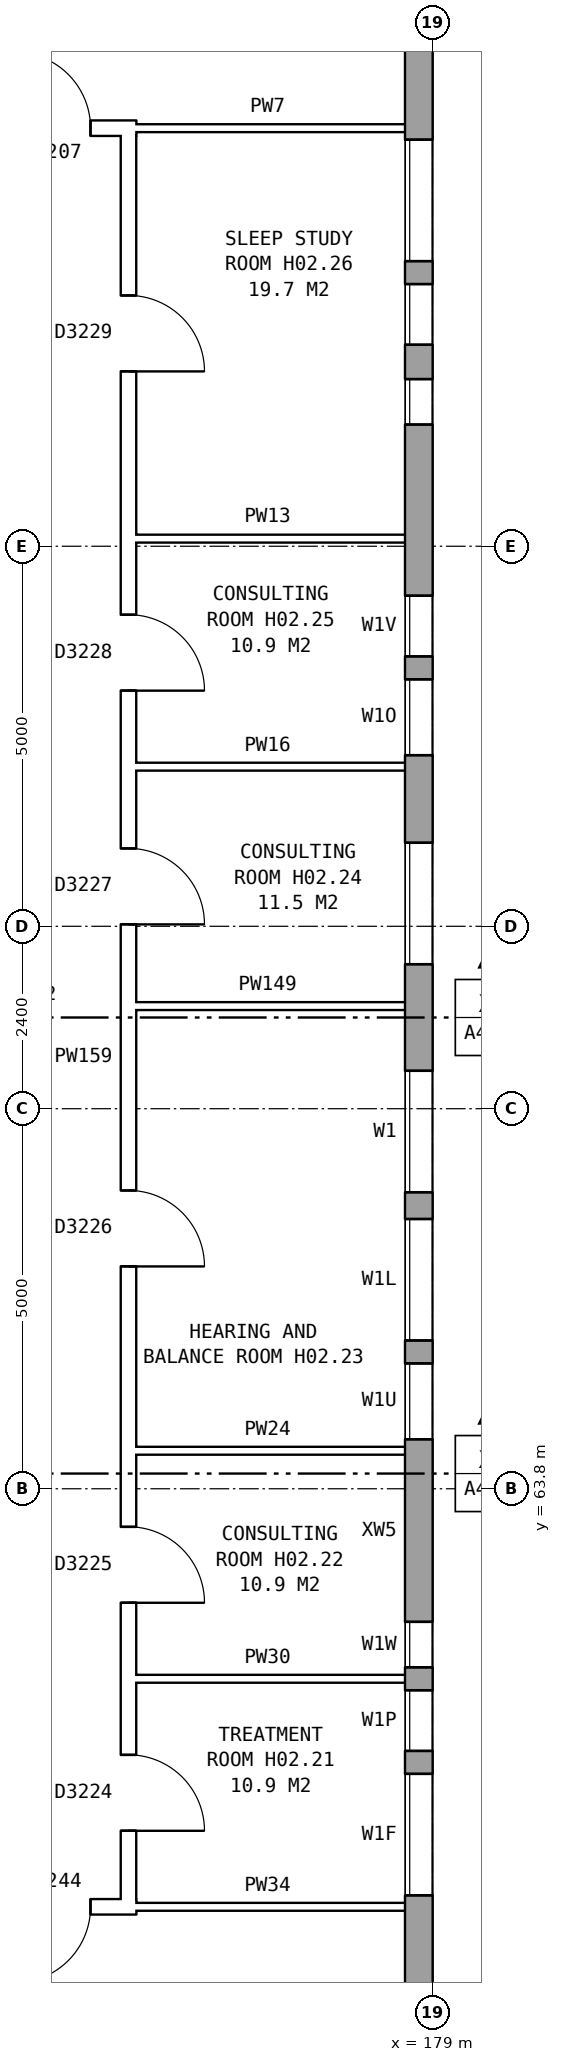
"""IFC4 building model, lengths in metres.
Left out: names, types, materials, properties, quantities, classifications, styles, units other than length and angle.
Written with IfcOpenShell. Run it as: python <this file> out.ifc"""

import sys

from ifc_helpers import new_model, si_unit, direction, frame, frame_2d, origin, place, context, subcontext, project, spatial, rectangle, extrude, element, fill, save


model = new_model("IFC4")
c1 = context("Model", 3, precision=1e-05, world=origin(), true_north=direction((0.0, 1.0)))
c2 = subcontext(c1, "Body", "Model", "MODEL_VIEW")
j1 = project(units=[si_unit("LENGTHUNIT", "METRE"), si_unit("PLANEANGLEUNIT", "RADIAN")], contexts=[c1])
p1 = place(None, origin())
s1 = spatial("IfcSite", under=j1, at=p1, CompositionType="ELEMENT")
p2 = place(p1, origin())
s2 = spatial("IfcBuilding", under=s1, at=p2, CompositionType="ELEMENT")
p3 = place(p2, frame((0.0, 0.0, 10.1)))
s3 = spatial("IfcBuildingStorey", under=s2, at=p3, CompositionType="ELEMENT", Elevation=10.1)
p4 = place(p3, frame((178.82, 57.075, 0.0), z_axis=(0.0, 0.0, 1.0), x_axis=(0.0, 1.0, 0.0)))
e1 = element("IfcWall", 1, at=p4, inside=s3, PredefinedType="STANDARD", context=c2, shape_type="SweptSolid", body=[
    extrude(rectangle(XDim=25.851, YDim=0.36, at=frame_2d((12.925, 0.0))), origin(), (0.0, 0.0, 1.0), 4.3),
])
p5 = place(p4, frame((1.375, 0.0, 0.8)))
e2 = element("IfcOpeningElement", 2, at=p5, cuts=e1, PredefinedType="OPENING", context=c2, shape_type="SweptSolid", body=[
    extrude(rectangle(XDim=1.6, YDim=1.5, at=frame_2d((0.8, 0.75))), frame((0.0, 0.19, 0.0), z_axis=(0.0, -1.0, 0.0), x_axis=(1.0, 0.0, 0.0)), (0.0, 0.0, 1.0), 0.38),
])
p6 = place(p4, frame((4.375, 0.0, 0.8)))
e3 = element("IfcOpeningElement", 3, at=p6, cuts=e1, PredefinedType="OPENING", context=c2, shape_type="SweptSolid", body=[
    extrude(rectangle(XDim=0.6, YDim=0.9, at=frame_2d((0.3, 0.45))), frame((0.0, 0.19, 0.0), z_axis=(0.0, -1.0, 0.0), x_axis=(1.0, 0.0, 0.0)), (0.0, 0.0, 1.0), 0.38),
])
p7 = place(p4, frame((7.375, 0.0, 1.7)))
e4 = element("IfcOpeningElement", 4, at=p7, cuts=e1, PredefinedType="OPENING", context=c2, shape_type="SweptSolid", body=[
    extrude(rectangle(XDim=1.0, YDim=0.9, at=frame_2d((0.5, 0.45))), frame((0.0, 0.19, 0.0), z_axis=(0.0, -1.0, 0.0), x_axis=(1.0, 0.0, 0.0)), (0.0, 0.0, 1.0), 0.38),
])
p8 = place(p4, frame((10.625, 0.0, 0.8)))
e5 = element("IfcOpeningElement", 5, at=p8, cuts=e1, PredefinedType="OPENING", context=c2, shape_type="SweptSolid", body=[
    extrude(rectangle(XDim=1.6, YDim=1.8, at=frame_2d((0.8, 0.9))), frame((0.0, 0.19, 0.0), z_axis=(0.0, -1.0, 0.0), x_axis=(1.0, 0.0, 0.0)), (0.0, 0.0, 1.0), 0.38),
])
p9 = place(p4, frame((13.625, 0.0, 0.8)))
e6 = element("IfcOpeningElement", 6, at=p9, cuts=e1, PredefinedType="OPENING", context=c2, shape_type="SweptSolid", body=[
    extrude(rectangle(XDim=1.6, YDim=1.8, at=frame_2d((0.8, 0.9))), frame((0.0, 0.19, 0.0), z_axis=(0.0, -1.0, 0.0), x_axis=(1.0, 0.0, 0.0)), (0.0, 0.0, 1.0), 0.38),
])
p10 = place(p4, frame((16.375, 0.0, 1.4)))
e7 = element("IfcOpeningElement", 7, at=p10, cuts=e1, PredefinedType="OPENING", context=c2, shape_type="SweptSolid", body=[
    extrude(rectangle(XDim=1.0, YDim=1.2, at=frame_2d((0.5, 0.6))), frame((0.0, 0.19, 0.0), z_axis=(0.0, -1.0, 0.0), x_axis=(1.0, 0.0, 0.0)), (0.0, 0.0, 1.0), 0.38),
])
p11 = place(p4, frame((20.725, 0.0, 0.8)))
e8 = element("IfcOpeningElement", 8, at=p11, cuts=e1, PredefinedType="OPENING", context=c2, shape_type="SweptSolid", body=[
    extrude(rectangle(XDim=0.6, YDim=0.9, at=frame_2d((0.3, 0.45))), frame((0.0, 0.19, 0.0), z_axis=(0.0, -1.0, 0.0), x_axis=(1.0, 0.0, 0.0)), (0.0, 0.0, 1.0), 0.38),
])
p12 = place(p4, frame((21.775, 0.0, 0.8)))
e9 = element("IfcOpeningElement", 9, at=p12, cuts=e1, PredefinedType="OPENING", context=c2, shape_type="SweptSolid", body=[
    extrude(rectangle(XDim=0.8, YDim=1.2, at=frame_2d((0.4, 0.6))), frame((0.0, 0.19, 0.0), z_axis=(0.0, -1.0, 0.0), x_axis=(1.0, 0.0, 0.0)), (0.0, 0.0, 1.0), 0.38),
])
p13 = place(p4, frame((3.275, 0.0, 0.8)))
e10 = element("IfcOpeningElement", 10, at=p13, cuts=e1, PredefinedType="OPENING", context=c2, shape_type="SweptSolid", body=[
    extrude(rectangle(XDim=0.8, YDim=1.2, at=frame_2d((0.4, 0.6))), frame((0.0, 0.19, 0.0), z_axis=(0.0, -1.0, 0.0), x_axis=(1.0, 0.0, 0.0)), (0.0, 0.0, 1.0), 0.38),
])
p14 = place(p4, frame((8.675, 0.0, 1.4)))
e11 = element("IfcOpeningElement", 11, at=p14, cuts=e1, PredefinedType="OPENING", context=c2, shape_type="SweptSolid", body=[
    extrude(rectangle(XDim=1.6, YDim=1.2, at=frame_2d((0.8, 0.6))), frame((0.0, 0.19, 0.0), z_axis=(0.0, -1.0, 0.0), x_axis=(1.0, 0.0, 0.0)), (0.0, 0.0, 1.0), 0.38),
])
p15 = place(p4, frame((17.675, 0.0, 1.7)))
e12 = element("IfcOpeningElement", 12, at=p15, cuts=e1, PredefinedType="OPENING", context=c2, shape_type="SweptSolid", body=[
    extrude(rectangle(XDim=0.8, YDim=0.9, at=frame_2d((0.4, 0.45))), frame((0.0, 0.19, 0.0), z_axis=(0.0, -1.0, 0.0), x_axis=(1.0, 0.0, 0.0)), (0.0, 0.0, 1.0), 0.38),
])
p16 = place(p4, frame((22.875, 0.0, 0.8)))
e13 = element("IfcOpeningElement", 13, at=p16, cuts=e1, PredefinedType="OPENING", context=c2, shape_type="SweptSolid", body=[
    extrude(rectangle(XDim=1.6, YDim=1.5, at=frame_2d((0.8, 0.75))), frame((0.0, 0.19, 0.0), z_axis=(0.0, -1.0, 0.0), x_axis=(1.0, 0.0, 0.0)), (0.0, 0.0, 1.0), 0.38),
])
p17 = place(p3, frame((157.53, 58.3, 0.0), z_axis=(0.0, 0.0, 1.0), x_axis=(1.0, 0.0, 0.0)))
e14 = element("IfcWall", 14, at=p17, inside=s3, PredefinedType="PARTITIONING", context=c2, shape_type="SweptSolid", body=[
    extrude(rectangle(XDim=17.572, YDim=0.2, at=frame_2d((8.786, 0.0))), origin(), (0.0, 0.0, 1.0), 4.3),
])
p18 = place(p17, frame((1.295, 0.0, 0.0)))
e15 = element("IfcOpeningElement", 15, at=p18, cuts=e14, PredefinedType="OPENING", context=c2, shape_type="SweptSolid", body=[
    extrude(rectangle(XDim=1.0, YDim=2.1, at=frame_2d((0.5, 1.05))), frame((0.0, 0.11, 0.0), z_axis=(0.0, -1.0, 0.0), x_axis=(1.0, 0.0, 0.0)), (0.0, 0.0, 1.0), 0.22),
])
p19 = place(p17, frame((4.47, 0.0, 0.0)))
e16 = element("IfcOpeningElement", 16, at=p19, cuts=e14, PredefinedType="OPENING", context=c2, shape_type="SweptSolid", body=[
    extrude(rectangle(XDim=1.0, YDim=2.1, at=frame_2d((0.5, 1.05))), frame((0.0, 0.11, 0.0), z_axis=(0.0, -1.0, 0.0), x_axis=(1.0, 0.0, 0.0)), (0.0, 0.0, 1.0), 0.22),
])
p20 = place(p17, frame((7.47, 0.0, 0.0)))
e17 = element("IfcOpeningElement", 17, at=p20, cuts=e14, PredefinedType="OPENING", context=c2, shape_type="SweptSolid", body=[
    extrude(rectangle(XDim=1.0, YDim=2.1, at=frame_2d((0.5, 1.05))), frame((0.0, 0.11, 0.0), z_axis=(0.0, -1.0, 0.0), x_axis=(1.0, 0.0, 0.0)), (0.0, 0.0, 1.0), 0.22),
])
p21 = place(p17, frame((10.47, 0.0, 0.0)))
e18 = element("IfcOpeningElement", 18, at=p21, cuts=e14, PredefinedType="OPENING", context=c2, shape_type="SweptSolid", body=[
    extrude(rectangle(XDim=1.0, YDim=2.1, at=frame_2d((0.5, 1.05))), frame((0.0, 0.11, 0.0), z_axis=(0.0, -1.0, 0.0), x_axis=(1.0, 0.0, 0.0)), (0.0, 0.0, 1.0), 0.22),
])
p22 = place(p17, frame((13.47, 0.0, 0.0)))
e19 = element("IfcOpeningElement", 19, at=p22, cuts=e14, PredefinedType="OPENING", context=c2, shape_type="SweptSolid", body=[
    extrude(rectangle(XDim=1.0, YDim=2.1, at=frame_2d((0.5, 1.05))), frame((0.0, 0.11, 0.0), z_axis=(0.0, -1.0, 0.0), x_axis=(1.0, 0.0, 0.0)), (0.0, 0.0, 1.0), 0.22),
])
p23 = place(p17, frame((15.971, 0.0, 0.0)))
e20 = element("IfcOpeningElement", 20, at=p23, cuts=e14, PredefinedType="OPENING", context=c2, shape_type="SweptSolid", body=[
    extrude(rectangle(XDim=1.0, YDim=2.1, at=frame_2d((0.5, 1.05))), frame((0.0, 0.11, 0.0), z_axis=(0.0, -1.0, 0.0), x_axis=(1.0, 0.0, 0.0)), (0.0, 0.0, 1.0), 0.22),
])
for number, where, z_axis, x_axis in (
    (21, (174.9, 58.3, 0.0), (0.0, 0.0, 1.0), (1.0, 0.0, 0.0)),
    (22, (174.9, 61.3, 0.0), (0.0, 0.0, 1.0), (1.0, 0.0, 0.0)),
    (23, (174.9, 64.3, 0.0), (0.0, 0.0, 1.0), (1.0, 0.0, 0.0)),
    (24, (174.9, 70.15, 0.0), (0.0, 0.0, 1.0), (1.0, 0.0, 0.0)),
    (25, (174.9, 73.3, 0.0), (0.0, 0.0, 1.0), (1.0, 0.0, 0.0)),
    (26, (174.9, 76.3, 0.0), (0.0, 0.0, 1.0), (1.0, 0.0, 0.0)),
):
    element("IfcWall", number, at=place(p3, frame(where, z_axis=z_axis, x_axis=x_axis)), inside=s3, PredefinedType="PARTITIONING", context=c2, shape_type="SweptSolid", body=[
        extrude(rectangle(XDim=3.86, YDim=0.1, at=frame_2d((1.93, 0.0))), origin(), (0.0, 0.0, 1.0), 4.3),
    ])
p24 = place(p3, frame((157.53, 81.7, 0.0), z_axis=(0.0, 0.0, 1.0), x_axis=(1.0, 0.0, 0.0)))
e27 = element("IfcWall", 27, at=p24, inside=s3, PredefinedType="PARTITIONING", context=c2, shape_type="SweptSolid", body=[
    extrude(rectangle(XDim=17.572, YDim=0.2, at=frame_2d((8.786, 0.0))), origin(), (0.0, 0.0, 1.0), 4.3),
])
p25 = place(p24, frame((1.295, 0.0, 0.0)))
e28 = element("IfcOpeningElement", 28, at=p25, cuts=e27, PredefinedType="OPENING", context=c2, shape_type="SweptSolid", body=[
    extrude(rectangle(XDim=1.0, YDim=2.1, at=frame_2d((0.5, 1.05))), frame((0.0, 0.11, 0.0), z_axis=(0.0, -1.0, 0.0), x_axis=(1.0, 0.0, 0.0)), (0.0, 0.0, 1.0), 0.22),
])
p26 = place(p24, frame((4.47, 0.0, 0.0)))
e29 = element("IfcOpeningElement", 29, at=p26, cuts=e27, PredefinedType="OPENING", context=c2, shape_type="SweptSolid", body=[
    extrude(rectangle(XDim=1.0, YDim=2.1, at=frame_2d((0.5, 1.05))), frame((0.0, 0.11, 0.0), z_axis=(0.0, -1.0, 0.0), x_axis=(1.0, 0.0, 0.0)), (0.0, 0.0, 1.0), 0.22),
])
p27 = place(p24, frame((8.97, 0.0, 0.0)))
e30 = element("IfcOpeningElement", 30, at=p27, cuts=e27, PredefinedType="OPENING", context=c2, shape_type="SweptSolid", body=[
    extrude(rectangle(XDim=1.0, YDim=2.1, at=frame_2d((0.5, 1.05))), frame((0.0, 0.11, 0.0), z_axis=(0.0, -1.0, 0.0), x_axis=(1.0, 0.0, 0.0)), (0.0, 0.0, 1.0), 0.22),
])
p28 = place(p24, frame((13.47, 0.0, 0.0)))
e31 = element("IfcOpeningElement", 31, at=p28, cuts=e27, PredefinedType="OPENING", context=c2, shape_type="SweptSolid", body=[
    extrude(rectangle(XDim=1.0, YDim=2.1, at=frame_2d((0.5, 1.05))), frame((0.0, 0.11, 0.0), z_axis=(0.0, -1.0, 0.0), x_axis=(1.0, 0.0, 0.0)), (0.0, 0.0, 1.0), 0.22),
])
p29 = place(p24, frame((15.971, 0.0, 0.0)))
e32 = element("IfcOpeningElement", 32, at=p29, cuts=e27, PredefinedType="OPENING", context=c2, shape_type="SweptSolid", body=[
    extrude(rectangle(XDim=1.0, YDim=2.1, at=frame_2d((0.5, 1.05))), frame((0.0, 0.11, 0.0), z_axis=(0.0, -1.0, 0.0), x_axis=(1.0, 0.0, 0.0)), (0.0, 0.0, 1.0), 0.22),
])
p30 = place(p3, frame((174.9, 81.7, 0.0), z_axis=(0.0, 0.0, 1.0), x_axis=(1.0, 0.0, 0.0)))
e33 = element("IfcWall", 33, at=p30, inside=s3, PredefinedType="PARTITIONING", context=c2, shape_type="SweptSolid", body=[
    extrude(rectangle(XDim=3.86, YDim=0.1, at=frame_2d((1.93, 0.0))), origin(), (0.0, 0.0, 1.0), 4.3),
])
p31 = place(p3, frame((175.0, 58.2, 0.0), z_axis=(0.0, 0.0, 1.0), x_axis=(0.0, 1.0, 0.0)))
e34 = element("IfcWall", 34, at=p31, inside=s3, PredefinedType="PARTITIONING", context=c2, shape_type="SweptSolid", body=[
    extrude(rectangle(XDim=23.6, YDim=0.2, at=frame_2d((11.8, 0.0))), origin(), (0.0, 0.0, 1.0), 4.3),
])
p32 = place(p31, frame((1.1, 0.0, 0.0)))
e35 = element("IfcOpeningElement", 35, at=p32, cuts=e34, PredefinedType="OPENING", context=c2, shape_type="SweptSolid", body=[
    extrude(rectangle(XDim=1.0, YDim=2.1, at=frame_2d((0.5, 1.05))), frame((0.0, 0.11, 0.0), z_axis=(0.0, -1.0, 0.0), x_axis=(1.0, 0.0, 0.0)), (0.0, 0.0, 1.0), 0.22),
])
p33 = place(p31, frame((4.1, 0.0, 0.0)))
e36 = element("IfcOpeningElement", 36, at=p33, cuts=e34, PredefinedType="OPENING", context=c2, shape_type="SweptSolid", body=[
    extrude(rectangle(XDim=1.0, YDim=2.1, at=frame_2d((0.5, 1.05))), frame((0.0, 0.11, 0.0), z_axis=(0.0, -1.0, 0.0), x_axis=(1.0, 0.0, 0.0)), (0.0, 0.0, 1.0), 0.22),
])
p34 = place(p31, frame((8.525, 0.0, 0.0)))
e37 = element("IfcOpeningElement", 37, at=p34, cuts=e34, PredefinedType="OPENING", context=c2, shape_type="SweptSolid", body=[
    extrude(rectangle(XDim=1.0, YDim=2.1, at=frame_2d((0.5, 1.05))), frame((0.0, 0.11, 0.0), z_axis=(0.0, -1.0, 0.0), x_axis=(1.0, 0.0, 0.0)), (0.0, 0.0, 1.0), 0.22),
])
p35 = place(p31, frame((13.025, 0.0, 0.0)))
e38 = element("IfcOpeningElement", 38, at=p35, cuts=e34, PredefinedType="OPENING", context=c2, shape_type="SweptSolid", body=[
    extrude(rectangle(XDim=1.0, YDim=2.1, at=frame_2d((0.5, 1.05))), frame((0.0, 0.11, 0.0), z_axis=(0.0, -1.0, 0.0), x_axis=(1.0, 0.0, 0.0)), (0.0, 0.0, 1.0), 0.22),
])
p36 = place(p31, frame((16.1, 0.0, 0.0)))
e39 = element("IfcOpeningElement", 39, at=p36, cuts=e34, PredefinedType="OPENING", context=c2, shape_type="SweptSolid", body=[
    extrude(rectangle(XDim=1.0, YDim=2.1, at=frame_2d((0.5, 1.05))), frame((0.0, 0.11, 0.0), z_axis=(0.0, -1.0, 0.0), x_axis=(1.0, 0.0, 0.0)), (0.0, 0.0, 1.0), 0.22),
])
p37 = place(p31, frame((20.3, 0.0, 0.0)))
e40 = element("IfcOpeningElement", 40, at=p37, cuts=e34, PredefinedType="OPENING", context=c2, shape_type="SweptSolid", body=[
    extrude(rectangle(XDim=1.0, YDim=2.1, at=frame_2d((0.5, 1.05))), frame((0.0, 0.11, 0.0), z_axis=(0.0, -1.0, 0.0), x_axis=(1.0, 0.0, 0.0)), (0.0, 0.0, 1.0), 0.22),
])
p38 = place(p5, origin())
e41 = element("IfcWindow", 41, at=p38, inside=s3, PartitioningType="SINGLE_PANEL", PredefinedType="WINDOW", context=c2, shape_type="SweptSolid", body=[
    extrude(rectangle(XDim=1.6, YDim=1.5, at=frame_2d((0.8, 0.75))), frame((0.0, 0.15, 0.0), z_axis=(0.0, -1.0, 0.0), x_axis=(1.0, 0.0, 0.0)), (0.0, 0.0, 1.0), 0.06),
])
fill(e2, e41)
p39 = place(p6, origin())
e42 = element("IfcWindow", 42, at=p39, inside=s3, PartitioningType="SINGLE_PANEL", PredefinedType="WINDOW", context=c2, shape_type="SweptSolid", body=[
    extrude(rectangle(XDim=0.6, YDim=0.9, at=frame_2d((0.3, 0.45))), frame((0.0, 0.15, 0.0), z_axis=(0.0, -1.0, 0.0), x_axis=(1.0, 0.0, 0.0)), (0.0, 0.0, 1.0), 0.06),
])
fill(e3, e42)
p40 = place(p7, origin())
e43 = element("IfcWindow", 43, at=p40, inside=s3, PartitioningType="SINGLE_PANEL", PredefinedType="WINDOW", context=c2, shape_type="SweptSolid", body=[
    extrude(rectangle(XDim=1.0, YDim=0.9, at=frame_2d((0.5, 0.45))), frame((0.0, 0.15, 0.0), z_axis=(0.0, -1.0, 0.0), x_axis=(1.0, 0.0, 0.0)), (0.0, 0.0, 1.0), 0.06),
])
fill(e4, e43)
p41 = place(p8, origin())
e44 = element("IfcWindow", 44, at=p41, inside=s3, PartitioningType="SINGLE_PANEL", PredefinedType="WINDOW", context=c2, shape_type="SweptSolid", body=[
    extrude(rectangle(XDim=1.6, YDim=1.8, at=frame_2d((0.8, 0.9))), frame((0.0, 0.15, 0.0), z_axis=(0.0, -1.0, 0.0), x_axis=(1.0, 0.0, 0.0)), (0.0, 0.0, 1.0), 0.06),
])
fill(e5, e44)
p42 = place(p9, origin())
e45 = element("IfcWindow", 45, at=p42, inside=s3, PartitioningType="SINGLE_PANEL", PredefinedType="WINDOW", context=c2, shape_type="SweptSolid", body=[
    extrude(rectangle(XDim=1.6, YDim=1.8, at=frame_2d((0.8, 0.9))), frame((0.0, 0.15, 0.0), z_axis=(0.0, -1.0, 0.0), x_axis=(1.0, 0.0, 0.0)), (0.0, 0.0, 1.0), 0.06),
])
fill(e6, e45)
p43 = place(p10, origin())
e46 = element("IfcWindow", 46, at=p43, inside=s3, PartitioningType="SINGLE_PANEL", PredefinedType="WINDOW", context=c2, shape_type="SweptSolid", body=[
    extrude(rectangle(XDim=1.0, YDim=1.2, at=frame_2d((0.5, 0.6))), frame((0.0, 0.15, 0.0), z_axis=(0.0, -1.0, 0.0), x_axis=(1.0, 0.0, 0.0)), (0.0, 0.0, 1.0), 0.06),
])
fill(e7, e46)
p44 = place(p11, origin())
e47 = element("IfcWindow", 47, at=p44, inside=s3, PartitioningType="SINGLE_PANEL", PredefinedType="WINDOW", context=c2, shape_type="SweptSolid", body=[
    extrude(rectangle(XDim=0.6, YDim=0.9, at=frame_2d((0.3, 0.45))), frame((0.0, 0.15, 0.0), z_axis=(0.0, -1.0, 0.0), x_axis=(1.0, 0.0, 0.0)), (0.0, 0.0, 1.0), 0.06),
])
fill(e8, e47)
p45 = place(p12, origin())
e48 = element("IfcWindow", 48, at=p45, inside=s3, PartitioningType="SINGLE_PANEL", PredefinedType="WINDOW", context=c2, shape_type="SweptSolid", body=[
    extrude(rectangle(XDim=0.8, YDim=1.2, at=frame_2d((0.4, 0.6))), frame((0.0, 0.15, 0.0), z_axis=(0.0, -1.0, 0.0), x_axis=(1.0, 0.0, 0.0)), (0.0, 0.0, 1.0), 0.06),
])
fill(e9, e48)
p46 = place(p23, frame((1.0, 0.0, 0.0), z_axis=(0.0, 0.0, 1.0), x_axis=(-1.0, 0.0, 0.0)))
e49 = element("IfcDoor", 49, at=p46, inside=s3, OperationType="SINGLE_SWING_RIGHT", PredefinedType="DOOR", context=c2, shape_type="SweptSolid", body=[
    extrude(rectangle(XDim=1.0, YDim=2.1, at=frame_2d((0.5, 1.05))), frame((0.0, 0.025, 0.0), z_axis=(0.0, -1.0, 0.0), x_axis=(1.0, 0.0, 0.0)), (0.0, 0.0, 1.0), 0.05),
])
fill(e20, e49)
p47 = place(p29, origin())
e50 = element("IfcDoor", 50, at=p47, inside=s3, OperationType="SINGLE_SWING_LEFT", PredefinedType="DOOR", context=c2, shape_type="SweptSolid", body=[
    extrude(rectangle(XDim=1.0, YDim=2.1, at=frame_2d((0.5, 1.05))), frame((0.0, 0.025, 0.0), z_axis=(0.0, -1.0, 0.0), x_axis=(1.0, 0.0, 0.0)), (0.0, 0.0, 1.0), 0.05),
])
fill(e32, e50)
p48 = place(p32, frame((1.0, 0.0, 0.0), z_axis=(0.0, 0.0, 1.0), x_axis=(-1.0, 0.0, 0.0)))
e51 = element("IfcDoor", 51, at=p48, inside=s3, OperationType="SINGLE_SWING_RIGHT", PredefinedType="DOOR", context=c2, shape_type="SweptSolid", body=[
    extrude(rectangle(XDim=1.0, YDim=2.1, at=frame_2d((0.5, 1.05))), frame((0.0, 0.025, 0.0), z_axis=(0.0, -1.0, 0.0), x_axis=(1.0, 0.0, 0.0)), (0.0, 0.0, 1.0), 0.05),
])
fill(e35, e51)
p49 = place(p33, frame((1.0, 0.0, 0.0), z_axis=(0.0, 0.0, 1.0), x_axis=(-1.0, 0.0, 0.0)))
e52 = element("IfcDoor", 52, at=p49, inside=s3, OperationType="SINGLE_SWING_RIGHT", PredefinedType="DOOR", context=c2, shape_type="SweptSolid", body=[
    extrude(rectangle(XDim=1.0, YDim=2.1, at=frame_2d((0.5, 1.05))), frame((0.0, 0.025, 0.0), z_axis=(0.0, -1.0, 0.0), x_axis=(1.0, 0.0, 0.0)), (0.0, 0.0, 1.0), 0.05),
])
fill(e36, e52)
p50 = place(p34, frame((1.0, 0.0, 0.0), z_axis=(0.0, 0.0, 1.0), x_axis=(-1.0, 0.0, 0.0)))
e53 = element("IfcDoor", 53, at=p50, inside=s3, OperationType="SINGLE_SWING_RIGHT", PredefinedType="DOOR", context=c2, shape_type="SweptSolid", body=[
    extrude(rectangle(XDim=1.0, YDim=2.1, at=frame_2d((0.5, 1.05))), frame((0.0, 0.025, 0.0), z_axis=(0.0, -1.0, 0.0), x_axis=(1.0, 0.0, 0.0)), (0.0, 0.0, 1.0), 0.05),
])
fill(e37, e53)
p51 = place(p35, frame((1.0, 0.0, 0.0), z_axis=(0.0, 0.0, 1.0), x_axis=(-1.0, 0.0, 0.0)))
e54 = element("IfcDoor", 54, at=p51, inside=s3, OperationType="SINGLE_SWING_RIGHT", PredefinedType="DOOR", context=c2, shape_type="SweptSolid", body=[
    extrude(rectangle(XDim=1.0, YDim=2.1, at=frame_2d((0.5, 1.05))), frame((0.0, 0.025, 0.0), z_axis=(0.0, -1.0, 0.0), x_axis=(1.0, 0.0, 0.0)), (0.0, 0.0, 1.0), 0.05),
])
fill(e38, e54)
p52 = place(p36, frame((1.0, 0.0, 0.0), z_axis=(0.0, 0.0, 1.0), x_axis=(-1.0, 0.0, 0.0)))
e55 = element("IfcDoor", 55, at=p52, inside=s3, OperationType="SINGLE_SWING_RIGHT", PredefinedType="DOOR", context=c2, shape_type="SweptSolid", body=[
    extrude(rectangle(XDim=1.0, YDim=2.1, at=frame_2d((0.5, 1.05))), frame((0.0, 0.025, 0.0), z_axis=(0.0, -1.0, 0.0), x_axis=(1.0, 0.0, 0.0)), (0.0, 0.0, 1.0), 0.05),
])
fill(e39, e55)
p53 = place(p37, frame((1.0, 0.0, 0.0), z_axis=(0.0, 0.0, 1.0), x_axis=(-1.0, 0.0, 0.0)))
e56 = element("IfcDoor", 56, at=p53, inside=s3, OperationType="SINGLE_SWING_RIGHT", PredefinedType="DOOR", context=c2, shape_type="SweptSolid", body=[
    extrude(rectangle(XDim=1.0, YDim=2.1, at=frame_2d((0.5, 1.05))), frame((0.0, 0.025, 0.0), z_axis=(0.0, -1.0, 0.0), x_axis=(1.0, 0.0, 0.0)), (0.0, 0.0, 1.0), 0.05),
])
fill(e40, e56)
p54 = place(p13, origin())
e57 = element("IfcWindow", 57, at=p54, inside=s3, PartitioningType="SINGLE_PANEL", PredefinedType="WINDOW", context=c2, shape_type="SweptSolid", body=[
    extrude(rectangle(XDim=0.8, YDim=1.2, at=frame_2d((0.4, 0.6))), frame((0.0, 0.15, 0.0), z_axis=(0.0, -1.0, 0.0), x_axis=(1.0, 0.0, 0.0)), (0.0, 0.0, 1.0), 0.06),
])
fill(e10, e57)
p55 = place(p14, origin())
e58 = element("IfcWindow", 58, at=p55, inside=s3, PartitioningType="SINGLE_PANEL", PredefinedType="WINDOW", context=c2, shape_type="SweptSolid", body=[
    extrude(rectangle(XDim=1.6, YDim=1.2, at=frame_2d((0.8, 0.6))), frame((0.0, 0.15, 0.0), z_axis=(0.0, -1.0, 0.0), x_axis=(1.0, 0.0, 0.0)), (0.0, 0.0, 1.0), 0.06),
])
fill(e11, e58)
p56 = place(p15, origin())
e59 = element("IfcWindow", 59, at=p56, inside=s3, PartitioningType="SINGLE_PANEL", PredefinedType="WINDOW", context=c2, shape_type="SweptSolid", body=[
    extrude(rectangle(XDim=0.8, YDim=0.9, at=frame_2d((0.4, 0.45))), frame((0.0, 0.15, 0.0), z_axis=(0.0, -1.0, 0.0), x_axis=(1.0, 0.0, 0.0)), (0.0, 0.0, 1.0), 0.06),
])
fill(e12, e59)
p57 = place(p16, origin())
e60 = element("IfcWindow", 60, at=p57, inside=s3, PartitioningType="SINGLE_PANEL", PredefinedType="WINDOW", context=c2, shape_type="SweptSolid", body=[
    extrude(rectangle(XDim=1.6, YDim=1.5, at=frame_2d((0.8, 0.75))), frame((0.0, 0.15, 0.0), z_axis=(0.0, -1.0, 0.0), x_axis=(1.0, 0.0, 0.0)), (0.0, 0.0, 1.0), 0.06),
])
fill(e13, e60)
save(model, sys.argv[1])
